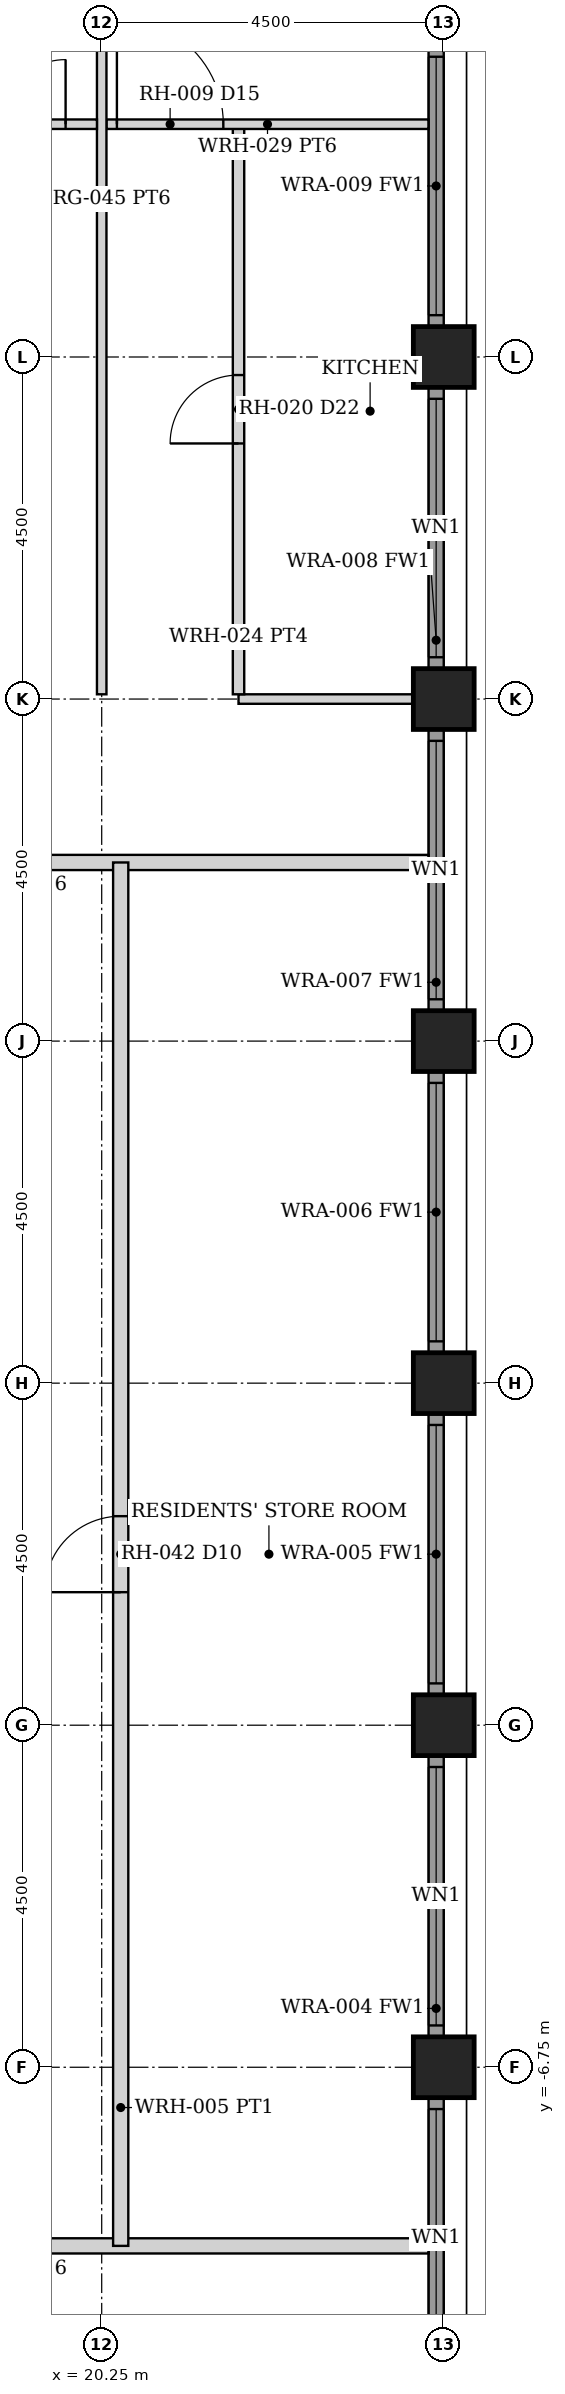
"""IFC4 building model, lengths in metres.
Left out: names, types, materials, properties, quantities, classifications, styles, units other than length and angle.
Written with IfcOpenShell. Run it as: python <this file> out.ifc"""

import sys

from ifc_helpers import new_model, si_unit, direction, frame, frame_2d, origin, origin_2d, place, context, subcontext, project, spatial, rectangle, hollow_rectangle, extrude, element, fill, save


model = new_model("IFC4")
c1 = context("Model", 3, precision=1e-05, world=origin(), true_north=direction((0.0, 1.0)))
c2 = subcontext(c1, "Body", "Model", "MODEL_VIEW")
j1 = project(units=[si_unit("LENGTHUNIT", "METRE"), si_unit("PLANEANGLEUNIT", "RADIAN")], contexts=[c1])
p1 = place(None, origin())
s1 = spatial("IfcSite", under=j1, at=p1, CompositionType="ELEMENT")
p2 = place(p1, origin())
s2 = spatial("IfcBuilding", under=s1, at=p2, CompositionType="ELEMENT")
p3 = place(p2, frame((0.0, 0.0, 100.0)))
s3 = spatial("IfcBuildingStorey", under=s2, at=p3, CompositionType="ELEMENT", Elevation=100.0)
for number, where, z_axis, x_axis in (
    (1, (24.75, -6.75, 0.0), (0.0, 0.0, 1.0), (1.0, 0.0, 0.0)),
    (2, (24.75, -2.25, 0.0), (0.0, 0.0, 1.0), (1.0, 0.0, 0.0)),
    (3, (24.75, 2.25, 0.0), (0.0, 0.0, 1.0), (1.0, 0.0, 0.0)),
    (4, (24.75, 6.75, 0.0), (0.0, 0.0, 1.0), (1.0, 0.0, 0.0)),
    (5, (24.75, 11.25, 0.0), (0.0, 0.0, 1.0), (1.0, 0.0, 0.0)),
    (6, (24.75, 15.75, 0.0), (0.0, 0.0, 1.0), (1.0, 0.0, 0.0)),
):
    element("IfcColumn", number, at=place(p3, frame(where, z_axis=z_axis, x_axis=x_axis)), inside=s3, PredefinedType="COLUMN", context=c2, shape_type="SweptSolid", body=[
        extrude(hollow_rectangle(XDim=0.8, YDim=0.8, WallThickness=0.06, at=origin_2d()), origin(), (0.0, 0.0, 1.0), 3.5),
    ])
p4 = place(p3, frame((24.65, -10.845, 0.0), z_axis=(0.0, 0.0, 1.0), x_axis=(0.0, 1.0, 0.0)))
e7 = element("IfcWall", 7, at=p4, inside=s3, PredefinedType="SOLIDWALL", context=c2, shape_type="SweptSolid", body=[
    extrude(rectangle(XDim=3.69, YDim=0.2, at=frame_2d((1.845, 0.0))), origin(), (0.0, 0.0, 1.0), 2.379),
])
p5 = place(p4, frame((0.145, 0.0, 0.3)))
e8 = element("IfcOpeningElement", 8, at=p5, cuts=e7, PredefinedType="OPENING", context=c2, shape_type="SweptSolid", body=[
    extrude(rectangle(XDim=3.4, YDim=1.929, at=frame_2d((1.7, 0.964))), frame((0.0, 0.11, 0.0), z_axis=(0.0, -1.0, 0.0), x_axis=(1.0, 0.0, 0.0)), (0.0, 0.0, 1.0), 0.22),
])
p6 = place(p3, frame((24.65, -6.345, 0.0), z_axis=(0.0, 0.0, 1.0), x_axis=(0.0, 1.0, 0.0)))
e9 = element("IfcWall", 9, at=p6, inside=s3, PredefinedType="SOLIDWALL", context=c2, shape_type="SweptSolid", body=[
    extrude(rectangle(XDim=3.69, YDim=0.2, at=frame_2d((1.845, 0.0))), origin(), (0.0, 0.0, 1.0), 2.379),
])
p7 = place(p6, frame((0.145, 0.0, 0.3)))
e10 = element("IfcOpeningElement", 10, at=p7, cuts=e9, PredefinedType="OPENING", context=c2, shape_type="SweptSolid", body=[
    extrude(rectangle(XDim=3.4, YDim=1.929, at=frame_2d((1.7, 0.964))), frame((0.0, 0.11, 0.0), z_axis=(0.0, -1.0, 0.0), x_axis=(1.0, 0.0, 0.0)), (0.0, 0.0, 1.0), 0.22),
])
p8 = place(p3, frame((24.65, -1.845, 0.0), z_axis=(0.0, 0.0, 1.0), x_axis=(0.0, 1.0, 0.0)))
e11 = element("IfcWall", 11, at=p8, inside=s3, PredefinedType="SOLIDWALL", context=c2, shape_type="SweptSolid", body=[
    extrude(rectangle(XDim=3.69, YDim=0.2, at=frame_2d((1.845, 0.0))), origin(), (0.0, 0.0, 1.0), 2.379),
])
p9 = place(p8, frame((0.145, 0.0, 0.3)))
e12 = element("IfcOpeningElement", 12, at=p9, cuts=e11, PredefinedType="OPENING", context=c2, shape_type="SweptSolid", body=[
    extrude(rectangle(XDim=3.4, YDim=1.929, at=frame_2d((1.7, 0.964))), frame((0.0, 0.11, 0.0), z_axis=(0.0, -1.0, 0.0), x_axis=(1.0, 0.0, 0.0)), (0.0, 0.0, 1.0), 0.22),
])
p10 = place(p3, frame((24.65, 2.655, 0.0), z_axis=(0.0, 0.0, 1.0), x_axis=(0.0, 1.0, 0.0)))
e13 = element("IfcWall", 13, at=p10, inside=s3, PredefinedType="SOLIDWALL", context=c2, shape_type="SweptSolid", body=[
    extrude(rectangle(XDim=3.69, YDim=0.2, at=frame_2d((1.845, 0.0))), origin(), (0.0, 0.0, 1.0), 2.379),
])
p11 = place(p10, frame((0.145, 0.0, 0.3)))
e14 = element("IfcOpeningElement", 14, at=p11, cuts=e13, PredefinedType="OPENING", context=c2, shape_type="SweptSolid", body=[
    extrude(rectangle(XDim=3.4, YDim=1.929, at=frame_2d((1.7, 0.964))), frame((0.0, 0.11, 0.0), z_axis=(0.0, -1.0, 0.0), x_axis=(1.0, 0.0, 0.0)), (0.0, 0.0, 1.0), 0.22),
])
p12 = place(p3, frame((24.65, 7.155, 0.0), z_axis=(0.0, 0.0, 1.0), x_axis=(0.0, 1.0, 0.0)))
e15 = element("IfcWall", 15, at=p12, inside=s3, PredefinedType="SOLIDWALL", context=c2, shape_type="SweptSolid", body=[
    extrude(rectangle(XDim=3.69, YDim=0.2, at=frame_2d((1.845, 0.0))), origin(), (0.0, 0.0, 1.0), 2.379),
])
p13 = place(p12, frame((0.145, 0.0, 0.3)))
e16 = element("IfcOpeningElement", 16, at=p13, cuts=e15, PredefinedType="OPENING", context=c2, shape_type="SweptSolid", body=[
    extrude(rectangle(XDim=3.4, YDim=1.929, at=frame_2d((1.7, 0.964))), frame((0.0, 0.11, 0.0), z_axis=(0.0, -1.0, 0.0), x_axis=(1.0, 0.0, 0.0)), (0.0, 0.0, 1.0), 0.22),
])
p14 = place(p3, frame((24.65, 11.655, 0.0), z_axis=(0.0, 0.0, 1.0), x_axis=(0.0, 1.0, 0.0)))
e17 = element("IfcWall", 17, at=p14, inside=s3, PredefinedType="SOLIDWALL", context=c2, shape_type="SweptSolid", body=[
    extrude(rectangle(XDim=3.69, YDim=0.2, at=frame_2d((1.845, 0.0))), origin(), (0.0, 0.0, 1.0), 2.379),
])
p15 = place(p14, frame((0.145, 0.0, 0.3)))
e18 = element("IfcOpeningElement", 18, at=p15, cuts=e17, PredefinedType="OPENING", context=c2, shape_type="SweptSolid", body=[
    extrude(rectangle(XDim=3.4, YDim=1.929, at=frame_2d((1.7, 0.964))), frame((0.0, 0.11, 0.0), z_axis=(0.0, -1.0, 0.0), x_axis=(1.0, 0.0, 0.0)), (0.0, 0.0, 1.0), 0.22),
])
p16 = place(p3, frame((24.65, 16.155, 0.0), z_axis=(0.0, 0.0, 1.0), x_axis=(0.0, 1.0, 0.0)))
e19 = element("IfcWall", 19, at=p16, inside=s3, PredefinedType="SOLIDWALL", context=c2, shape_type="SweptSolid", body=[
    extrude(rectangle(XDim=3.69, YDim=0.2, at=frame_2d((1.845, 0.0))), origin(), (0.0, 0.0, 1.0), 2.379),
])
p17 = place(p16, frame((0.145, 0.0, 0.3)))
e20 = element("IfcOpeningElement", 20, at=p17, cuts=e19, PredefinedType="OPENING", context=c2, shape_type="SweptSolid", body=[
    extrude(rectangle(XDim=3.4, YDim=1.929, at=frame_2d((1.7, 0.964))), frame((0.0, 0.11, 0.0), z_axis=(0.0, -1.0, 0.0), x_axis=(1.0, 0.0, 0.0)), (0.0, 0.0, 1.0), 0.22),
])
p18 = place(p3, frame((-24.55, 9.1, 0.0), z_axis=(0.0, 0.0, 1.0), x_axis=(1.0, 0.0, 0.0)))
e21 = element("IfcWall", 21, at=p18, inside=s3, PredefinedType="PARTITIONING", context=c2, shape_type="SweptSolid", body=[
    extrude(rectangle(XDim=49.1, YDim=0.2, at=frame_2d((24.55, 0.0))), origin(), (0.0, 0.0, 1.0), 2.373),
])
p19 = place(p18, frame((5.05, 0.0, 0.0)))
e22 = element("IfcOpeningElement", 22, at=p19, cuts=e21, PredefinedType="OPENING", context=c2, shape_type="SweptSolid", body=[
    extrude(rectangle(XDim=1.0, YDim=2.3, at=frame_2d((0.5, 1.15))), frame((0.0, 0.11, 0.0), z_axis=(0.0, -1.0, 0.0), x_axis=(1.0, 0.0, 0.0)), (0.0, 0.0, 1.0), 0.22),
])
p20 = place(p18, frame((22.5, 0.0, 0.0)))
e23 = element("IfcOpeningElement", 23, at=p20, cuts=e21, PredefinedType="OPENING", context=c2, shape_type="SweptSolid", body=[
    extrude(rectangle(XDim=0.9, YDim=2.1, at=frame_2d((0.45, 1.05))), frame((0.0, 0.11, 0.0), z_axis=(0.0, -1.0, 0.0), x_axis=(1.0, 0.0, 0.0)), (0.0, 0.0, 1.0), 0.22),
])
p21 = place(p18, frame((43.05, 0.0, 0.0)))
e24 = element("IfcOpeningElement", 24, at=p21, cuts=e21, PredefinedType="OPENING", context=c2, shape_type="SweptSolid", body=[
    extrude(rectangle(XDim=1.0, YDim=2.3, at=frame_2d((0.5, 1.15))), frame((0.0, 0.11, 0.0), z_axis=(0.0, -1.0, 0.0), x_axis=(1.0, 0.0, 0.0)), (0.0, 0.0, 1.0), 0.22),
])
p22 = place(p3, frame((-24.55, -9.1, 0.0), z_axis=(0.0, 0.0, 1.0), x_axis=(1.0, 0.0, 0.0)))
e25 = element("IfcWall", 25, at=p22, inside=s3, PredefinedType="PARTITIONING", context=c2, shape_type="SweptSolid", body=[
    extrude(rectangle(XDim=49.1, YDim=0.2, at=frame_2d((24.55, 0.0))), origin(), (0.0, 0.0, 1.0), 2.373),
])
p23 = place(p22, frame((5.05, 0.0, 0.0)))
e26 = element("IfcOpeningElement", 26, at=p23, cuts=e25, PredefinedType="OPENING", context=c2, shape_type="SweptSolid", body=[
    extrude(rectangle(XDim=1.0, YDim=2.3, at=frame_2d((0.5, 1.15))), frame((0.0, 0.11, 0.0), z_axis=(0.0, -1.0, 0.0), x_axis=(1.0, 0.0, 0.0)), (0.0, 0.0, 1.0), 0.22),
])
p24 = place(p22, frame((22.5, 0.0, 0.0)))
e27 = element("IfcOpeningElement", 27, at=p24, cuts=e25, PredefinedType="OPENING", context=c2, shape_type="SweptSolid", body=[
    extrude(rectangle(XDim=0.9, YDim=2.1, at=frame_2d((0.45, 1.05))), frame((0.0, 0.11, 0.0), z_axis=(0.0, -1.0, 0.0), x_axis=(1.0, 0.0, 0.0)), (0.0, 0.0, 1.0), 0.22),
])
p25 = place(p22, frame((43.05, 0.0, 0.0)))
e28 = element("IfcOpeningElement", 28, at=p25, cuts=e25, PredefinedType="OPENING", context=c2, shape_type="SweptSolid", body=[
    extrude(rectangle(XDim=1.0, YDim=2.3, at=frame_2d((0.5, 1.15))), frame((0.0, 0.11, 0.0), z_axis=(0.0, -1.0, 0.0), x_axis=(1.0, 0.0, 0.0)), (0.0, 0.0, 1.0), 0.22),
])
p26 = place(p3, frame((20.5, -9.1, 0.0), z_axis=(0.0, 0.0, 1.0), x_axis=(0.0, 1.0, 0.0)))
e29 = element("IfcWall", 29, at=p26, inside=s3, PredefinedType="PARTITIONING", context=c2, shape_type="SweptSolid", body=[
    extrude(rectangle(XDim=18.2, YDim=0.2, at=frame_2d((9.1, 0.0))), origin(), (0.0, 0.0, 1.0), 2.373),
])
p27 = place(p26, frame((8.6, 0.0, 0.0)))
e30 = element("IfcOpeningElement", 30, at=p27, cuts=e29, PredefinedType="OPENING", context=c2, shape_type="SweptSolid", body=[
    extrude(rectangle(XDim=1.0, YDim=2.1, at=frame_2d((0.5, 1.05))), frame((0.0, 0.11, 0.0), z_axis=(0.0, -1.0, 0.0), x_axis=(1.0, 0.0, 0.0)), (0.0, 0.0, 1.0), 0.22),
])
p28 = place(p3, frame((22.05, 11.25, 0.0), z_axis=(0.0, 0.0, 1.0), x_axis=(1.0, 0.0, 0.0)))
e31 = element("IfcWall", 31, at=p28, inside=s3, PredefinedType="PARTITIONING", context=c2, shape_type="SweptSolid", body=[
    extrude(rectangle(XDim=2.3, YDim=0.125, at=frame_2d((1.15, 0.0))), origin(), (0.0, 0.0, 1.0), 2.373),
])
p29 = place(p3, frame((22.05, 11.312, 0.0), z_axis=(0.0, 0.0, 1.0), x_axis=(0.0, 1.0, 0.0)))
e32 = element("IfcWall", 32, at=p29, inside=s3, PredefinedType="PARTITIONING", context=c2, shape_type="SweptSolid", body=[
    extrude(rectangle(XDim=7.5, YDim=0.15, at=frame_2d((3.75, 0.0))), origin(), (0.0, 0.0, 1.0), 2.373),
])
p30 = place(p29, frame((3.3, 0.0, 0.0)))
e33 = element("IfcOpeningElement", 33, at=p30, cuts=e32, PredefinedType="OPENING", context=c2, shape_type="SweptSolid", body=[
    extrude(rectangle(XDim=0.9, YDim=2.1, at=frame_2d((0.45, 1.05))), frame((0.0, 0.085, 0.0), z_axis=(0.0, -1.0, 0.0), x_axis=(1.0, 0.0, 0.0)), (0.0, 0.0, 1.0), 0.17),
])
p31 = place(p3, frame((20.312, 18.812, 0.0), z_axis=(0.0, 0.0, 1.0), x_axis=(1.0, 0.0, 0.0)))
e34 = element("IfcWall", 34, at=p31, inside=s3, PredefinedType="PARTITIONING", context=c2, shape_type="SweptSolid", body=[
    extrude(rectangle(XDim=4.238, YDim=0.125, at=frame_2d((2.119, 0.0))), origin(), (0.0, 0.0, 1.0), 2.373),
])
p32 = place(p31, frame((0.137, 0.0, 0.0)))
e35 = element("IfcOpeningElement", 35, at=p32, cuts=e34, PredefinedType="OPENING", context=c2, shape_type="SweptSolid", body=[
    extrude(rectangle(XDim=1.4, YDim=2.1, at=frame_2d((0.7, 1.05))), frame((0.0, 0.073, 0.0), z_axis=(0.0, -1.0, 0.0), x_axis=(1.0, 0.0, 0.0)), (0.0, 0.0, 1.0), 0.145),
])
p33 = place(p3, frame((20.25, 11.312, 0.0), z_axis=(0.0, 0.0, 1.0), x_axis=(0.0, 1.0, 0.0)))
e36 = element("IfcWall", 36, at=p33, inside=s3, PredefinedType="PARTITIONING", context=c2, shape_type="SweptSolid", body=[
    extrude(rectangle(XDim=13.038, YDim=0.125, at=frame_2d((6.519, 0.0))), origin(), (0.0, 0.0, 1.0), 2.373),
])
p34 = place(p3, frame((15.812, 18.812, 0.0), z_axis=(0.0, 0.0, 1.0), x_axis=(1.0, 0.0, 0.0)))
e37 = element("IfcWall", 37, at=p34, inside=s3, PredefinedType="PARTITIONING", context=c2, shape_type="SweptSolid", body=[
    extrude(rectangle(XDim=4.375, YDim=0.125, at=frame_2d((2.188, 0.0))), origin(), (0.0, 0.0, 1.0), 2.373),
])
p35 = place(p34, frame((3.113, 0.0, 0.0)))
e38 = element("IfcOpeningElement", 38, at=p35, cuts=e37, PredefinedType="OPENING", context=c2, shape_type="SweptSolid", body=[
    extrude(rectangle(XDim=0.85, YDim=2.1, at=frame_2d((0.425, 1.05))), frame((0.0, 0.073, 0.0), z_axis=(0.0, -1.0, 0.0), x_axis=(1.0, 0.0, 0.0)), (0.0, 0.0, 1.0), 0.145),
])
p36 = place(p34, frame((0.881, 0.0, 0.0)))
e39 = element("IfcOpeningElement", 39, at=p36, cuts=e37, PredefinedType="OPENING", context=c2, shape_type="SweptSolid", body=[
    extrude(rectangle(XDim=0.8, YDim=2.1, at=frame_2d((0.4, 1.05))), frame((0.0, 0.073, 0.0), z_axis=(0.0, -1.0, 0.0), x_axis=(1.0, 0.0, 0.0)), (0.0, 0.0, 1.0), 0.145),
])
p37 = place(p5, origin())
e40 = element("IfcWindow", 40, at=p37, inside=s3, PartitioningType="SINGLE_PANEL", PredefinedType="WINDOW", context=c2, shape_type="SweptSolid", body=[
    extrude(rectangle(XDim=3.4, YDim=1.929, at=frame_2d((1.7, 0.964))), frame((0.0, 0.03, 0.0), z_axis=(0.0, -1.0, 0.0), x_axis=(1.0, 0.0, 0.0)), (0.0, 0.0, 1.0), 0.06),
])
fill(e8, e40)
p38 = place(p7, origin())
e41 = element("IfcWindow", 41, at=p38, inside=s3, PartitioningType="SINGLE_PANEL", PredefinedType="WINDOW", context=c2, shape_type="SweptSolid", body=[
    extrude(rectangle(XDim=3.4, YDim=1.929, at=frame_2d((1.7, 0.964))), frame((0.0, 0.03, 0.0), z_axis=(0.0, -1.0, 0.0), x_axis=(1.0, 0.0, 0.0)), (0.0, 0.0, 1.0), 0.06),
])
fill(e10, e41)
p39 = place(p9, origin())
e42 = element("IfcWindow", 42, at=p39, inside=s3, PartitioningType="SINGLE_PANEL", PredefinedType="WINDOW", context=c2, shape_type="SweptSolid", body=[
    extrude(rectangle(XDim=3.4, YDim=1.929, at=frame_2d((1.7, 0.964))), frame((0.0, 0.03, 0.0), z_axis=(0.0, -1.0, 0.0), x_axis=(1.0, 0.0, 0.0)), (0.0, 0.0, 1.0), 0.06),
])
fill(e12, e42)
p40 = place(p11, origin())
e43 = element("IfcWindow", 43, at=p40, inside=s3, PartitioningType="SINGLE_PANEL", PredefinedType="WINDOW", context=c2, shape_type="SweptSolid", body=[
    extrude(rectangle(XDim=3.4, YDim=1.929, at=frame_2d((1.7, 0.964))), frame((0.0, 0.03, 0.0), z_axis=(0.0, -1.0, 0.0), x_axis=(1.0, 0.0, 0.0)), (0.0, 0.0, 1.0), 0.06),
])
fill(e14, e43)
p41 = place(p13, origin())
e44 = element("IfcWindow", 44, at=p41, inside=s3, PartitioningType="SINGLE_PANEL", PredefinedType="WINDOW", context=c2, shape_type="SweptSolid", body=[
    extrude(rectangle(XDim=3.4, YDim=1.929, at=frame_2d((1.7, 0.964))), frame((0.0, 0.03, 0.0), z_axis=(0.0, -1.0, 0.0), x_axis=(1.0, 0.0, 0.0)), (0.0, 0.0, 1.0), 0.06),
])
fill(e16, e44)
p42 = place(p15, origin())
e45 = element("IfcWindow", 45, at=p42, inside=s3, PartitioningType="SINGLE_PANEL", PredefinedType="WINDOW", context=c2, shape_type="SweptSolid", body=[
    extrude(rectangle(XDim=3.4, YDim=1.929, at=frame_2d((1.7, 0.964))), frame((0.0, 0.03, 0.0), z_axis=(0.0, -1.0, 0.0), x_axis=(1.0, 0.0, 0.0)), (0.0, 0.0, 1.0), 0.06),
])
fill(e18, e45)
p43 = place(p17, origin())
e46 = element("IfcWindow", 46, at=p43, inside=s3, PartitioningType="SINGLE_PANEL", PredefinedType="WINDOW", context=c2, shape_type="SweptSolid", body=[
    extrude(rectangle(XDim=3.4, YDim=1.929, at=frame_2d((1.7, 0.964))), frame((0.0, 0.03, 0.0), z_axis=(0.0, -1.0, 0.0), x_axis=(1.0, 0.0, 0.0)), (0.0, 0.0, 1.0), 0.06),
])
fill(e20, e46)
p44 = place(p30, origin())
e47 = element("IfcDoor", 47, at=p44, inside=s3, OperationType="SINGLE_SWING_LEFT", PredefinedType="DOOR", context=c2, shape_type="SweptSolid", body=[
    extrude(rectangle(XDim=0.9, YDim=2.1, at=frame_2d((0.45, 1.05))), frame((0.0, 0.025, 0.0), z_axis=(0.0, -1.0, 0.0), x_axis=(1.0, 0.0, 0.0)), (0.0, 0.0, 1.0), 0.05),
])
fill(e33, e47)
p45 = place(p32, origin())
e48 = element("IfcDoor", 48, at=p45, inside=s3, OperationType="SINGLE_SWING_LEFT", PredefinedType="DOOR", context=c2, shape_type="SweptSolid", body=[
    extrude(rectangle(XDim=1.4, YDim=2.1, at=frame_2d((0.7, 1.05))), frame((0.0, 0.025, 0.0), z_axis=(0.0, -1.0, 0.0), x_axis=(1.0, 0.0, 0.0)), (0.0, 0.0, 1.0), 0.05),
])
fill(e35, e48)
p46 = place(p35, origin())
e49 = element("IfcDoor", 49, at=p46, inside=s3, OperationType="SINGLE_SWING_RIGHT", PredefinedType="DOOR", context=c2, shape_type="SweptSolid", body=[
    extrude(rectangle(XDim=0.85, YDim=2.1, at=frame_2d((0.425, 1.05))), frame((0.0, 0.025, 0.0), z_axis=(0.0, -1.0, 0.0), x_axis=(1.0, 0.0, 0.0)), (0.0, 0.0, 1.0), 0.05),
])
fill(e38, e49)
p47 = place(p27, origin())
e50 = element("IfcDoor", 50, at=p47, inside=s3, OperationType="SINGLE_SWING_LEFT", PredefinedType="DOOR", context=c2, shape_type="SweptSolid", body=[
    extrude(rectangle(XDim=1.0, YDim=2.1, at=frame_2d((0.5, 1.05))), frame((0.0, 0.025, 0.0), z_axis=(0.0, -1.0, 0.0), x_axis=(1.0, 0.0, 0.0)), (0.0, 0.0, 1.0), 0.05),
])
fill(e30, e50)
save(model, sys.argv[1])
